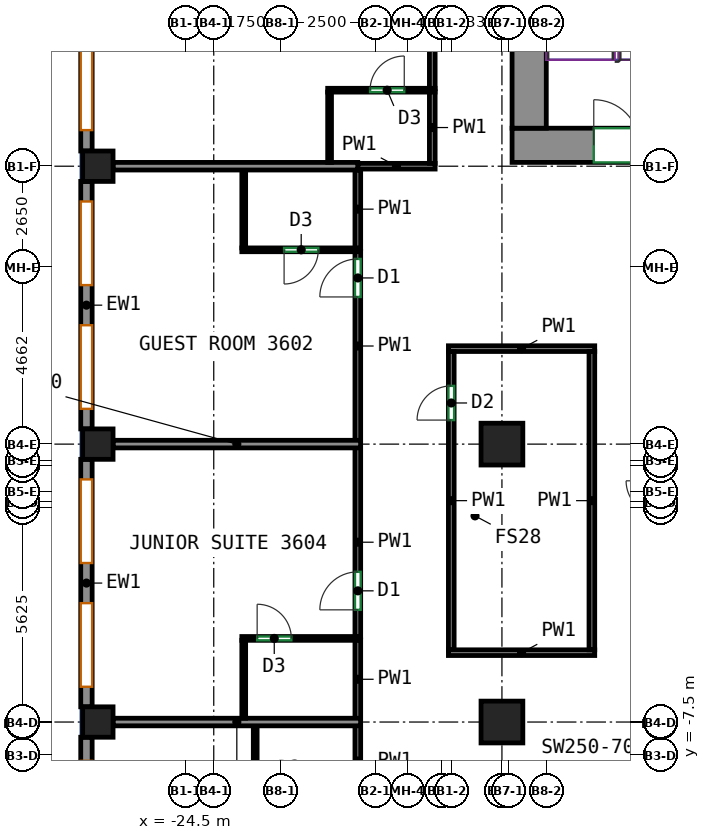
"""IFC4 building model, lengths in metres.
Left out: names, types, materials, properties, quantities, classifications, styles, units other than length and angle.
Written with IfcOpenShell. Run it as: python <this file> out.ifc"""

import sys

from ifc_helpers import new_model, si_unit, direction, frame, frame_2d, origin, origin_2d, place, context, subcontext, project, spatial, rectangle, extrude, source, transform, mapped, element, fill, save


model = new_model("IFC4")
c1 = context("Model", 3, precision=1e-05, world=origin(), true_north=direction((0.0, 1.0)))
c2 = subcontext(c1, "Body", "Model", "MODEL_VIEW")
j1 = project(units=[si_unit("LENGTHUNIT", "METRE"), si_unit("PLANEANGLEUNIT", "RADIAN")], contexts=[c1])
p1 = place(None, origin())
s1 = spatial("IfcSite", under=j1, at=p1, CompositionType="ELEMENT")
p2 = place(p1, origin())
s2 = spatial("IfcBuilding", under=s1, at=p2, CompositionType="ELEMENT")
p3 = place(p2, frame((0.0, 0.0, 157.5)))
s3 = spatial("IfcBuildingStorey", under=s2, at=p3, CompositionType="ELEMENT", Elevation=157.5)
m1 = source(origin(), c2, "Body", "SweptSolid", [
    extrude(rectangle(XDim=0.8, YDim=0.8, at=origin_2d()), origin(), (0.0, 0.0, 1.0), 3.12),
])
for number, where, z_axis, x_axis in (
    (1, (-26.8, -6.625, 0.0), (0.0, 0.0, 1.0), (1.0, 0.0, 0.0)),
    (2, (-26.8, 0.688, 0.0), (0.0, 0.0, 1.0), (1.0, 0.0, 0.0)),
    (3, (-26.8, 8.0, 0.0), (0.0, 0.0, 1.0), (1.0, 0.0, 0.0)),
):
    element("IfcColumn", number, at=place(p3, frame(where, z_axis=z_axis, x_axis=x_axis)), inside=s3, PredefinedType="COLUMN", context=c2, shape_type="MappedRepresentation", body=[
        mapped(m1, transform((0.0, 0.0, 0.0))),
    ])
m2 = source(origin(), c2, "Body", "SweptSolid", [
    extrude(rectangle(XDim=1.1, YDim=1.1, at=origin_2d()), origin(), (0.0, 0.0, 1.0), 3.12),
])
for number, where, z_axis, x_axis in (
    (4, (-16.167, -6.625, 0.0), (0.0, 0.0, 1.0), (1.0, 0.0, 0.0)),
    (5, (-16.167, 0.688, 0.0), (0.0, 0.0, 1.0), (1.0, 0.0, 0.0)),
):
    element("IfcColumn", number, at=place(p3, frame(where, z_axis=z_axis, x_axis=x_axis)), inside=s3, PredefinedType="COLUMN", context=c2, shape_type="MappedRepresentation", body=[
        mapped(m2, transform((0.0, 0.0, 0.0))),
    ])
m3 = source(origin(), c2, "Body", "SweptSolid", [
    extrude(rectangle(XDim=5.53, YDim=0.9, at=frame_2d((2.765, 0.0))), origin(), (0.0, 0.0, 1.0), 3.12),
])
p4 = place(p3, frame((-15.9, 8.55, 0.0), z_axis=(0.0, 0.0, 1.0), x_axis=(1.0, 0.0, 0.0)))
e6 = element("IfcWall", 6, at=p4, inside=s3, PredefinedType="SHEAR", context=c2, shape_type="MappedRepresentation", body=[
    mapped(m3, transform((0.0, 0.0, 0.0))),
])
p5 = place(p4, frame((2.15, 0.0, 0.0)))
e7 = element("IfcOpeningElement", 7, at=p5, cuts=e6, PredefinedType="OPENING", context=c2, shape_type="SweptSolid", body=[
    extrude(rectangle(XDim=1.2, YDim=2.1, at=frame_2d((0.6, 1.05))), frame((0.0, 0.46, 0.0), z_axis=(0.0, -1.0, 0.0), x_axis=(1.0, 0.0, 0.0)), (0.0, 0.0, 1.0), 0.92),
])
m4 = source(origin(), c2, "Body", "SweptSolid", [
    extrude(rectangle(XDim=12.0, YDim=0.9, at=frame_2d((6.0, 0.0))), origin(), (0.0, 0.0, 1.0), 3.12),
])
p6 = place(p3, frame((-15.45, 9.0, 0.0), z_axis=(0.0, 0.0, 1.0), x_axis=(0.0, 1.0, 0.0)))
e8 = element("IfcWall", 8, at=p6, inside=s3, PredefinedType="SHEAR", context=c2, shape_type="MappedRepresentation", body=[
    mapped(m4, transform((0.0, 0.0, 0.0))),
])
m5 = source(origin(), c2, "Body", "SweptSolid", [
    extrude(rectangle(XDim=13.2, YDim=0.3, at=frame_2d((6.6, 0.0))), origin(), (0.0, 0.0, 1.0), 3.12),
])
p7 = place(p3, frame((-27.1, 21.6, 0.0), z_axis=(0.0, 0.0, 1.0), x_axis=(0.0, -1.0, 0.0)))
e9 = element("IfcWall", 9, at=p7, inside=s3, PredefinedType="SOLIDWALL", context=c2, shape_type="MappedRepresentation", body=[
    mapped(m5, transform((0.0, 0.0, 0.0))),
])
p8 = place(p7, frame((0.55, 0.0, 0.85)))
e10 = element("IfcOpeningElement", 10, at=p8, cuts=e9, PredefinedType="OPENING", context=c2, shape_type="SweptSolid", body=[
    extrude(rectangle(XDim=2.2, YDim=1.95, at=frame_2d((1.1, 0.975))), frame((0.0, 0.16, 0.0), z_axis=(0.0, -1.0, 0.0), x_axis=(1.0, 0.0, 0.0)), (0.0, 0.0, 1.0), 0.32),
])
p9 = place(p7, frame((3.85, 0.0, 0.85)))
e11 = element("IfcOpeningElement", 11, at=p9, cuts=e9, PredefinedType="OPENING", context=c2, shape_type="SweptSolid", body=[
    extrude(rectangle(XDim=2.2, YDim=1.95, at=frame_2d((1.1, 0.975))), frame((0.0, 0.16, 0.0), z_axis=(0.0, -1.0, 0.0), x_axis=(1.0, 0.0, 0.0)), (0.0, 0.0, 1.0), 0.32),
])
p10 = place(p7, frame((7.15, 0.0, 0.85)))
e12 = element("IfcOpeningElement", 12, at=p10, cuts=e9, PredefinedType="OPENING", context=c2, shape_type="SweptSolid", body=[
    extrude(rectangle(XDim=2.2, YDim=1.95, at=frame_2d((1.1, 0.975))), frame((0.0, 0.16, 0.0), z_axis=(0.0, -1.0, 0.0), x_axis=(1.0, 0.0, 0.0)), (0.0, 0.0, 1.0), 0.32),
])
p11 = place(p7, frame((10.45, 0.0, 0.85)))
e13 = element("IfcOpeningElement", 13, at=p11, cuts=e9, PredefinedType="OPENING", context=c2, shape_type="SweptSolid", body=[
    extrude(rectangle(XDim=2.2, YDim=1.95, at=frame_2d((1.1, 0.975))), frame((0.0, 0.16, 0.0), z_axis=(0.0, -1.0, 0.0), x_axis=(1.0, 0.0, 0.0)), (0.0, 0.0, 1.0), 0.32),
])
m6 = source(origin(), c2, "Body", "SweptSolid", [
    extrude(rectangle(XDim=6.513, YDim=0.3, at=frame_2d((3.256, 0.0))), origin(), (0.0, 0.0, 1.0), 3.12),
])
p12 = place(p3, frame((-27.1, 7.6, 0.0), z_axis=(0.0, 0.0, 1.0), x_axis=(0.0, -1.0, 0.0)))
e14 = element("IfcWall", 14, at=p12, inside=s3, PredefinedType="SOLIDWALL", context=c2, shape_type="MappedRepresentation", body=[
    mapped(m6, transform((0.0, 0.0, 0.0))),
])
p13 = place(p12, frame((0.528, 0.0, 0.85)))
e15 = element("IfcOpeningElement", 15, at=p13, cuts=e14, PredefinedType="OPENING", context=c2, shape_type="SweptSolid", body=[
    extrude(rectangle(XDim=2.2, YDim=1.95, at=frame_2d((1.1, 0.975))), frame((0.0, 0.16, 0.0), z_axis=(0.0, -1.0, 0.0), x_axis=(1.0, 0.0, 0.0)), (0.0, 0.0, 1.0), 0.32),
])
p14 = place(p12, frame((3.784, 0.0, 0.85)))
e16 = element("IfcOpeningElement", 16, at=p14, cuts=e14, PredefinedType="OPENING", context=c2, shape_type="SweptSolid", body=[
    extrude(rectangle(XDim=2.2, YDim=1.95, at=frame_2d((1.1, 0.975))), frame((0.0, 0.16, 0.0), z_axis=(0.0, -1.0, 0.0), x_axis=(1.0, 0.0, 0.0)), (0.0, 0.0, 1.0), 0.32),
])
p15 = place(p3, frame((-27.1, 0.288, 0.0), z_axis=(0.0, 0.0, 1.0), x_axis=(0.0, -1.0, 0.0)))
e17 = element("IfcWall", 17, at=p15, inside=s3, PredefinedType="SOLIDWALL", context=c2, shape_type="MappedRepresentation", body=[
    mapped(m6, transform((0.0, 0.0, 0.0))),
])
p16 = place(p15, frame((0.528, 0.0, 0.85)))
e18 = element("IfcOpeningElement", 18, at=p16, cuts=e17, PredefinedType="OPENING", context=c2, shape_type="SweptSolid", body=[
    extrude(rectangle(XDim=2.2, YDim=1.95, at=frame_2d((1.1, 0.975))), frame((0.0, 0.16, 0.0), z_axis=(0.0, -1.0, 0.0), x_axis=(1.0, 0.0, 0.0)), (0.0, 0.0, 1.0), 0.32),
])
p17 = place(p15, frame((3.784, 0.0, 0.85)))
e19 = element("IfcOpeningElement", 19, at=p17, cuts=e17, PredefinedType="OPENING", context=c2, shape_type="SweptSolid", body=[
    extrude(rectangle(XDim=2.2, YDim=1.95, at=frame_2d((1.1, 0.975))), frame((0.0, 0.16, 0.0), z_axis=(0.0, -1.0, 0.0), x_axis=(1.0, 0.0, 0.0)), (0.0, 0.0, 1.0), 0.32),
])
m7 = source(origin(), c2, "Body", "SweptSolid", [
    extrude(rectangle(XDim=10.325, YDim=0.3, at=frame_2d((5.163, 0.0))), origin(), (0.0, 0.0, 1.0), 3.12),
])
p18 = place(p3, frame((-27.1, -7.025, 0.0), z_axis=(0.0, 0.0, 1.0), x_axis=(0.0, -1.0, 0.0)))
e20 = element("IfcWall", 20, at=p18, inside=s3, PredefinedType="SOLIDWALL", context=c2, shape_type="MappedRepresentation", body=[
    mapped(m7, transform((0.0, 0.0, 0.0))),
])
p19 = place(p18, frame((0.621, 0.0, 0.85)))
e21 = element("IfcOpeningElement", 21, at=p19, cuts=e20, PredefinedType="OPENING", context=c2, shape_type="SweptSolid", body=[
    extrude(rectangle(XDim=2.2, YDim=1.95, at=frame_2d((1.1, 0.975))), frame((0.0, 0.16, 0.0), z_axis=(0.0, -1.0, 0.0), x_axis=(1.0, 0.0, 0.0)), (0.0, 0.0, 1.0), 0.32),
])
p20 = place(p18, frame((4.062, 0.0, 0.85)))
e22 = element("IfcOpeningElement", 22, at=p20, cuts=e20, PredefinedType="OPENING", context=c2, shape_type="SweptSolid", body=[
    extrude(rectangle(XDim=2.2, YDim=1.95, at=frame_2d((1.1, 0.975))), frame((0.0, 0.16, 0.0), z_axis=(0.0, -1.0, 0.0), x_axis=(1.0, 0.0, 0.0)), (0.0, 0.0, 1.0), 0.32),
])
p21 = place(p18, frame((7.504, 0.0, 0.85)))
e23 = element("IfcOpeningElement", 23, at=p21, cuts=e20, PredefinedType="OPENING", context=c2, shape_type="SweptSolid", body=[
    extrude(rectangle(XDim=2.2, YDim=1.95, at=frame_2d((1.1, 0.975))), frame((0.0, 0.16, 0.0), z_axis=(0.0, -1.0, 0.0), x_axis=(1.0, 0.0, 0.0)), (0.0, 0.0, 1.0), 0.32),
])
p22 = place(p3, frame((-19.959, -8.585, 0.0), z_axis=(0.0, 0.0, 1.0), x_axis=(0.0, 1.0, 0.0)))
e24 = element("IfcWall", 24, at=p22, inside=s3, PredefinedType="PARTITIONING", context=c2, shape_type="SweptSolid", body=[
    extrude(rectangle(XDim=1.87, YDim=0.15, at=frame_2d((0.935, 0.0))), origin(), (0.0, 0.0, 1.0), 3.12),
])
p23 = place(p3, frame((-19.959, -4.385, 0.0), z_axis=(0.0, 0.0, 1.0), x_axis=(0.0, 1.0, 0.0)))
e25 = element("IfcWall", 25, at=p23, inside=s3, PredefinedType="PARTITIONING", context=c2, shape_type="SweptSolid", body=[
    extrude(rectangle(XDim=4.983, YDim=0.15, at=frame_2d((2.491, 0.0))), origin(), (0.0, 0.0, 1.0), 3.12),
])
p24 = place(p23, frame((0.712, 0.0, 0.0)))
e26 = element("IfcOpeningElement", 26, at=p24, cuts=e25, PredefinedType="OPENING", context=c2, shape_type="SweptSolid", body=[
    extrude(rectangle(XDim=1.0, YDim=2.1, at=frame_2d((0.5, 1.05))), frame((0.0, 0.085, 0.0), z_axis=(0.0, -1.0, 0.0), x_axis=(1.0, 0.0, 0.0)), (0.0, 0.0, 1.0), 0.17),
])
p25 = place(p3, frame((-19.959, -6.535, 0.0), z_axis=(0.0, 0.0, 1.0), x_axis=(0.0, 1.0, 0.0)))
e27 = element("IfcWall", 27, at=p25, inside=s3, PredefinedType="PARTITIONING", context=c2, shape_type="SweptSolid", body=[
    extrude(rectangle(XDim=2.07, YDim=0.15, at=frame_2d((1.035, 0.0))), origin(), (0.0, 0.0, 1.0), 3.12),
])
p26 = place(p3, frame((-19.959, 0.778, 0.0), z_axis=(0.0, 0.0, 1.0), x_axis=(0.0, 1.0, 0.0)))
e28 = element("IfcWall", 28, at=p26, inside=s3, PredefinedType="PARTITIONING", context=c2, shape_type="SweptSolid", body=[
    extrude(rectangle(XDim=4.982, YDim=0.15, at=frame_2d((2.491, 0.0))), origin(), (0.0, 0.0, 1.0), 3.12),
])
p27 = place(p26, frame((3.782, 0.0, 0.0)))
e29 = element("IfcOpeningElement", 29, at=p27, cuts=e28, PredefinedType="OPENING", context=c2, shape_type="SweptSolid", body=[
    extrude(rectangle(XDim=1.0, YDim=2.1, at=frame_2d((0.5, 1.05))), frame((0.0, 0.085, 0.0), z_axis=(0.0, -1.0, 0.0), x_axis=(1.0, 0.0, 0.0)), (0.0, 0.0, 1.0), 0.17),
])
p28 = place(p3, frame((-19.959, 5.84, 0.0), z_axis=(0.0, 0.0, 1.0), x_axis=(0.0, 1.0, 0.0)))
e30 = element("IfcWall", 30, at=p28, inside=s3, PredefinedType="PARTITIONING", context=c2, shape_type="SweptSolid", body=[
    extrude(rectangle(XDim=2.06, YDim=0.15, at=frame_2d((1.03, 0.0))), origin(), (0.0, 0.0, 1.0), 3.12),
])
p29 = place(p3, frame((-18.0, 10.04, 0.0), z_axis=(0.0, 0.0, 1.0), x_axis=(0.0, 1.0, 0.0)))
e31 = element("IfcWall", 31, at=p29, inside=s3, PredefinedType="PARTITIONING", context=c2, shape_type="SweptSolid", body=[
    extrude(rectangle(XDim=11.885, YDim=0.15, at=frame_2d((5.942, 0.0))), origin(), (0.0, 0.0, 1.0), 3.12),
])
p30 = place(p29, frame((5.039, 0.0, 0.0)))
e32 = element("IfcOpeningElement", 32, at=p30, cuts=e31, PredefinedType="OPENING", context=c2, shape_type="SweptSolid", body=[
    extrude(rectangle(XDim=1.0, YDim=2.1, at=frame_2d((0.5, 1.05))), frame((0.0, 0.085, 0.0), z_axis=(0.0, -1.0, 0.0), x_axis=(1.0, 0.0, 0.0)), (0.0, 0.0, 1.0), 0.17),
])
p31 = place(p3, frame((-17.925, 8.0, 0.0), z_axis=(0.0, 0.0, 1.0), x_axis=(-1.0, 0.0, 0.0)))
e33 = element("IfcWall", 33, at=p31, inside=s3, PredefinedType="PARTITIONING", context=c2, shape_type="SweptSolid", body=[
    extrude(rectangle(XDim=2.034, YDim=0.15, at=frame_2d((1.017, 0.0))), origin(), (0.0, 0.0, 1.0), 3.12),
])
p32 = place(p3, frame((-18.0, 8.075, 0.0), z_axis=(0.0, 0.0, 1.0), x_axis=(0.0, 1.0, 0.0)))
e34 = element("IfcWall", 34, at=p32, inside=s3, PredefinedType="PARTITIONING", context=c2, shape_type="SweptSolid", body=[
    extrude(rectangle(XDim=1.885, YDim=0.15, at=frame_2d((0.942, 0.0))), origin(), (0.0, 0.0, 1.0), 3.12),
])
p33 = place(p3, frame((-17.575, 3.2, 0.0), z_axis=(0.0, 0.0, 1.0), x_axis=(1.0, 0.0, 0.0)))
e35 = element("IfcWall", 35, at=p33, inside=s3, PredefinedType="PARTITIONING", context=c2, shape_type="SweptSolid", body=[
    extrude(rectangle(XDim=3.85, YDim=0.15, at=frame_2d((1.925, 0.0))), origin(), (0.0, 0.0, 1.0), 3.12),
])
p34 = place(p3, frame((-17.5, -4.725, 0.0), z_axis=(0.0, 0.0, 1.0), x_axis=(0.0, 1.0, 0.0)))
e36 = element("IfcWall", 36, at=p34, inside=s3, PredefinedType="PARTITIONING", context=c2, shape_type="SweptSolid", body=[
    extrude(rectangle(XDim=7.85, YDim=0.15, at=frame_2d((3.925, 0.0))), origin(), (0.0, 0.0, 1.0), 3.12),
])
p35 = place(p34, frame((6.045, 0.0, 0.0)))
e37 = element("IfcOpeningElement", 37, at=p35, cuts=e36, PredefinedType="OPENING", context=c2, shape_type="SweptSolid", body=[
    extrude(rectangle(XDim=0.9, YDim=2.1, at=frame_2d((0.45, 1.05))), frame((0.0, 0.085, 0.0), z_axis=(0.0, -1.0, 0.0), x_axis=(1.0, 0.0, 0.0)), (0.0, 0.0, 1.0), 0.17),
])
p36 = place(p3, frame((-13.725, -4.8, 0.0), z_axis=(0.0, 0.0, 1.0), x_axis=(-1.0, 0.0, 0.0)))
e38 = element("IfcWall", 38, at=p36, inside=s3, PredefinedType="PARTITIONING", context=c2, shape_type="SweptSolid", body=[
    extrude(rectangle(XDim=3.85, YDim=0.15, at=frame_2d((1.925, 0.0))), origin(), (0.0, 0.0, 1.0), 3.12),
])
p37 = place(p3, frame((-13.8, 3.125, 0.0), z_axis=(0.0, 0.0, 1.0), x_axis=(0.0, -1.0, 0.0)))
e39 = element("IfcWall", 39, at=p37, inside=s3, PredefinedType="PARTITIONING", context=c2, shape_type="SweptSolid", body=[
    extrude(rectangle(XDim=7.85, YDim=0.15, at=frame_2d((3.925, 0.0))), origin(), (0.0, 0.0, 1.0), 3.12),
])
p38 = place(p3, frame((-22.659, -8.575, 0.0), z_axis=(0.0, 0.0, 1.0), x_axis=(0.0, 1.0, 0.0)))
e40 = element("IfcWall", 40, at=p38, inside=s3, PredefinedType="PARTITIONING", context=c2, shape_type="SweptSolid", body=[
    extrude(rectangle(XDim=1.85, YDim=0.1, at=frame_2d((0.925, 0.0))), origin(), (0.0, 0.0, 1.0), 3.12),
])
p39 = place(p3, frame((-26.4, -6.625, 0.0), z_axis=(0.0, 0.0, 1.0), x_axis=(1.0, 0.0, 0.0)))
e41 = element("IfcWall", 41, at=p39, inside=s3, PredefinedType="PARTITIONING", context=c2, shape_type="SweptSolid", body=[
    extrude(rectangle(XDim=6.514, YDim=0.2, at=frame_2d((3.257, 0.0))), origin(), (0.0, 0.0, 1.0), 2.52),
])
p40 = place(p3, frame((-22.961, -6.525, 0.0), z_axis=(0.0, 0.0, 1.0), x_axis=(0.0, 1.0, 0.0)))
e42 = element("IfcWall", 42, at=p40, inside=s3, PredefinedType="PARTITIONING", context=c2, shape_type="SweptSolid", body=[
    extrude(rectangle(XDim=2.05, YDim=0.1, at=frame_2d((1.025, 0.0))), origin(), (0.0, 0.0, 1.0), 3.12),
])
p41 = place(p3, frame((-23.011, -4.425, 0.0), z_axis=(0.0, 0.0, 1.0), x_axis=(1.0, 0.0, 0.0)))
e43 = element("IfcWall", 43, at=p41, inside=s3, PredefinedType="PARTITIONING", context=c2, shape_type="SweptSolid", body=[
    extrude(rectangle(XDim=3.125, YDim=0.1, at=frame_2d((1.562, 0.0))), origin(), (0.0, 0.0, 1.0), 3.12),
])
p42 = place(p41, frame((0.403, 0.0, 0.0)))
e44 = element("IfcOpeningElement", 44, at=p42, cuts=e43, PredefinedType="OPENING", context=c2, shape_type="SweptSolid", body=[
    extrude(rectangle(XDim=0.9, YDim=2.1, at=frame_2d((0.45, 1.05))), frame((0.0, 0.06, 0.0), z_axis=(0.0, -1.0, 0.0), x_axis=(1.0, 0.0, 0.0)), (0.0, 0.0, 1.0), 0.12),
])
p43 = place(p3, frame((-26.4, 0.688, 0.0), z_axis=(0.0, 0.0, 1.0), x_axis=(1.0, 0.0, 0.0)))
e45 = element("IfcWall", 45, at=p43, inside=s3, PredefinedType="PARTITIONING", context=c2, shape_type="SweptSolid", body=[
    extrude(rectangle(XDim=6.514, YDim=0.2, at=frame_2d((3.257, 0.0))), origin(), (0.0, 0.0, 1.0), 2.52),
])
p44 = place(p3, frame((-22.961, 5.85, 0.0), z_axis=(0.0, 0.0, 1.0), x_axis=(0.0, 1.0, 0.0)))
e46 = element("IfcWall", 46, at=p44, inside=s3, PredefinedType="PARTITIONING", context=c2, shape_type="SweptSolid", body=[
    extrude(rectangle(XDim=2.05, YDim=0.1, at=frame_2d((1.025, 0.0))), origin(), (0.0, 0.0, 1.0), 3.12),
])
p45 = place(p3, frame((-19.886, 5.8, 0.0), z_axis=(0.0, 0.0, 1.0), x_axis=(-1.0, 0.0, 0.0)))
e47 = element("IfcWall", 47, at=p45, inside=s3, PredefinedType="PARTITIONING", context=c2, shape_type="SweptSolid", body=[
    extrude(rectangle(XDim=3.125, YDim=0.1, at=frame_2d((1.562, 0.0))), origin(), (0.0, 0.0, 1.0), 3.12),
])
p46 = place(p45, frame((1.113, 0.0, 0.0)))
e48 = element("IfcOpeningElement", 48, at=p46, cuts=e47, PredefinedType="OPENING", context=c2, shape_type="SweptSolid", body=[
    extrude(rectangle(XDim=0.9, YDim=2.1, at=frame_2d((0.45, 1.05))), frame((0.0, 0.06, 0.0), z_axis=(0.0, -1.0, 0.0), x_axis=(1.0, 0.0, 0.0)), (0.0, 0.0, 1.0), 0.12),
])
p47 = place(p3, frame((-26.4, 8.0, 0.0), z_axis=(0.0, 0.0, 1.0), x_axis=(1.0, 0.0, 0.0)))
e49 = element("IfcWall", 49, at=p47, inside=s3, PredefinedType="PARTITIONING", context=c2, shape_type="SweptSolid", body=[
    extrude(rectangle(XDim=6.439, YDim=0.2, at=frame_2d((3.219, 0.0))), origin(), (0.0, 0.0, 1.0), 3.12),
])
p48 = place(p3, frame((-20.752, 10.0, 0.0), z_axis=(0.0, 0.0, 1.0), x_axis=(1.0, 0.0, 0.0)))
e50 = element("IfcWall", 50, at=p48, inside=s3, PredefinedType="PARTITIONING", context=c2, shape_type="SweptSolid", body=[
    extrude(rectangle(XDim=2.825, YDim=0.1, at=frame_2d((1.413, 0.0))), origin(), (0.0, 0.0, 1.0), 3.12),
])
p49 = place(p48, frame((1.115, 0.0, 0.0)))
e51 = element("IfcOpeningElement", 51, at=p49, cuts=e50, PredefinedType="OPENING", context=c2, shape_type="SweptSolid", body=[
    extrude(rectangle(XDim=0.9, YDim=2.1, at=frame_2d((0.45, 1.05))), frame((0.0, 0.06, 0.0), z_axis=(0.0, -1.0, 0.0), x_axis=(1.0, 0.0, 0.0)), (0.0, 0.0, 1.0), 0.12),
])
p50 = place(p3, frame((-20.702, 8.1, 0.0), z_axis=(0.0, 0.0, 1.0), x_axis=(0.0, 1.0, 0.0)))
e52 = element("IfcWall", 52, at=p50, inside=s3, PredefinedType="PARTITIONING", context=c2, shape_type="SweptSolid", body=[
    extrude(rectangle(XDim=1.85, YDim=0.1, at=frame_2d((0.925, 0.0))), origin(), (0.0, 0.0, 1.0), 3.12),
])
p51 = place(p11, origin())
e53 = element("IfcWindow", 53, at=p51, inside=s3, PartitioningType="SINGLE_PANEL", PredefinedType="WINDOW", context=c2, shape_type="SweptSolid", body=[
    extrude(rectangle(XDim=2.2, YDim=1.95, at=frame_2d((1.1, 0.975))), frame((0.0, 0.03, 0.0), z_axis=(0.0, -1.0, 0.0), x_axis=(1.0, 0.0, 0.0)), (0.0, 0.0, 1.0), 0.06),
])
fill(e13, e53)
p52 = place(p13, origin())
e54 = element("IfcWindow", 54, at=p52, inside=s3, PartitioningType="SINGLE_PANEL", PredefinedType="WINDOW", context=c2, shape_type="SweptSolid", body=[
    extrude(rectangle(XDim=2.2, YDim=1.95, at=frame_2d((1.1, 0.975))), frame((0.0, 0.03, 0.0), z_axis=(0.0, -1.0, 0.0), x_axis=(1.0, 0.0, 0.0)), (0.0, 0.0, 1.0), 0.06),
])
fill(e15, e54)
p53 = place(p14, origin())
e55 = element("IfcWindow", 55, at=p53, inside=s3, PartitioningType="SINGLE_PANEL", PredefinedType="WINDOW", context=c2, shape_type="SweptSolid", body=[
    extrude(rectangle(XDim=2.2, YDim=1.95, at=frame_2d((1.1, 0.975))), frame((0.0, 0.03, 0.0), z_axis=(0.0, -1.0, 0.0), x_axis=(1.0, 0.0, 0.0)), (0.0, 0.0, 1.0), 0.06),
])
fill(e16, e55)
p54 = place(p16, origin())
e56 = element("IfcWindow", 56, at=p54, inside=s3, PartitioningType="SINGLE_PANEL", PredefinedType="WINDOW", context=c2, shape_type="SweptSolid", body=[
    extrude(rectangle(XDim=2.2, YDim=1.95, at=frame_2d((1.1, 0.975))), frame((0.0, 0.03, 0.0), z_axis=(0.0, -1.0, 0.0), x_axis=(1.0, 0.0, 0.0)), (0.0, 0.0, 1.0), 0.06),
])
fill(e18, e56)
p55 = place(p17, origin())
e57 = element("IfcWindow", 57, at=p55, inside=s3, PartitioningType="SINGLE_PANEL", PredefinedType="WINDOW", context=c2, shape_type="SweptSolid", body=[
    extrude(rectangle(XDim=2.2, YDim=1.95, at=frame_2d((1.1, 0.975))), frame((0.0, 0.03, 0.0), z_axis=(0.0, -1.0, 0.0), x_axis=(1.0, 0.0, 0.0)), (0.0, 0.0, 1.0), 0.06),
])
fill(e19, e57)
p56 = place(p5, origin())
e58 = element("IfcDoor", 58, at=p56, inside=s3, OperationType="DOUBLE_DOOR_SINGLE_SWING", PredefinedType="DOOR", context=c2, shape_type="SweptSolid", body=[
    extrude(rectangle(XDim=1.2, YDim=2.1, at=frame_2d((0.6, 1.05))), frame((0.0, 0.355, 0.0), z_axis=(0.0, -1.0, 0.0), x_axis=(1.0, 0.0, 0.0)), (0.0, 0.0, 1.0), 0.05),
])
fill(e7, e58)
p57 = place(p42, origin())
e59 = element("IfcDoor", 59, at=p57, inside=s3, OperationType="SINGLE_SWING_LEFT", PredefinedType="DOOR", context=c2, shape_type="SweptSolid", body=[
    extrude(rectangle(XDim=0.9, YDim=2.1, at=frame_2d((0.45, 1.05))), frame((0.0, 0.025, 0.0), z_axis=(0.0, -1.0, 0.0), x_axis=(1.0, 0.0, 0.0)), (0.0, 0.0, 1.0), 0.05),
])
fill(e44, e59)
p58 = place(p24, origin())
e60 = element("IfcDoor", 60, at=p58, inside=s3, OperationType="SINGLE_SWING_LEFT", PredefinedType="DOOR", context=c2, shape_type="SweptSolid", body=[
    extrude(rectangle(XDim=1.0, YDim=2.1, at=frame_2d((0.5, 1.05))), frame((0.0, 0.025, 0.0), z_axis=(0.0, -1.0, 0.0), x_axis=(1.0, 0.0, 0.0)), (0.0, 0.0, 1.0), 0.05),
])
fill(e26, e60)
p59 = place(p35, origin())
e61 = element("IfcDoor", 61, at=p59, inside=s3, OperationType="SINGLE_SWING_LEFT", PredefinedType="DOOR", context=c2, shape_type="SweptSolid", body=[
    extrude(rectangle(XDim=0.9, YDim=2.1, at=frame_2d((0.45, 1.05))), frame((0.0, 0.025, 0.0), z_axis=(0.0, -1.0, 0.0), x_axis=(1.0, 0.0, 0.0)), (0.0, 0.0, 1.0), 0.05),
])
fill(e37, e61)
p60 = place(p27, origin())
e62 = element("IfcDoor", 62, at=p60, inside=s3, OperationType="SINGLE_SWING_LEFT", PredefinedType="DOOR", context=c2, shape_type="SweptSolid", body=[
    extrude(rectangle(XDim=1.0, YDim=2.1, at=frame_2d((0.5, 1.05))), frame((0.0, 0.025, 0.0), z_axis=(0.0, -1.0, 0.0), x_axis=(1.0, 0.0, 0.0)), (0.0, 0.0, 1.0), 0.05),
])
fill(e29, e62)
p61 = place(p46, origin())
e63 = element("IfcDoor", 63, at=p61, inside=s3, OperationType="SINGLE_SWING_RIGHT", PredefinedType="DOOR", context=c2, shape_type="SweptSolid", body=[
    extrude(rectangle(XDim=0.9, YDim=2.1, at=frame_2d((0.45, 1.05))), frame((0.0, 0.025, 0.0), z_axis=(0.0, -1.0, 0.0), x_axis=(1.0, 0.0, 0.0)), (0.0, 0.0, 1.0), 0.05),
])
fill(e48, e63)
p62 = place(p49, origin())
e64 = element("IfcDoor", 64, at=p62, inside=s3, OperationType="SINGLE_SWING_RIGHT", PredefinedType="DOOR", context=c2, shape_type="SweptSolid", body=[
    extrude(rectangle(XDim=0.9, YDim=2.1, at=frame_2d((0.45, 1.05))), frame((0.0, 0.025, 0.0), z_axis=(0.0, -1.0, 0.0), x_axis=(1.0, 0.0, 0.0)), (0.0, 0.0, 1.0), 0.05),
])
fill(e51, e64)
save(model, sys.argv[1])
